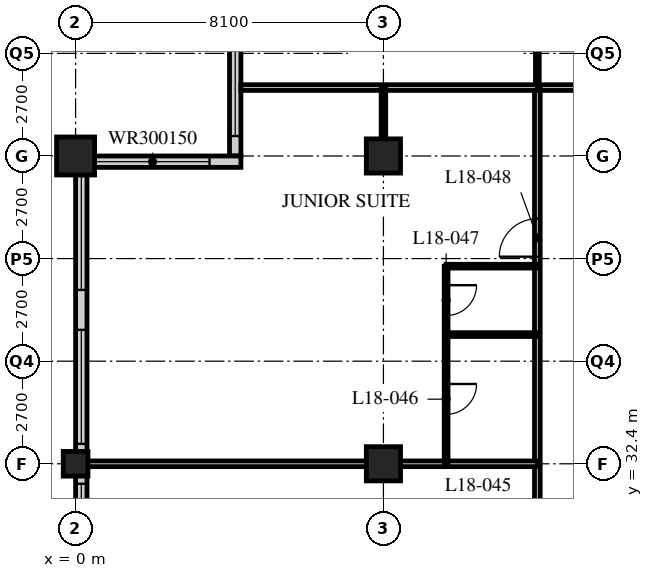
"""IFC4 building model, lengths in metres.
Left out: names, types, materials, properties, quantities, classifications, styles, units other than length and angle.
Written with IfcOpenShell. Run it as: python <this file> out.ifc"""

import sys

from ifc_helpers import new_model, si_unit, direction, frame, frame_2d, origin, origin_2d, place, context, subcontext, project, spatial, rectangle, hollow_rectangle, extrude, element, fill, save


model = new_model("IFC4")
c1 = context("Model", 3, precision=1e-05, world=origin(), true_north=direction((0.0, 1.0)))
c2 = subcontext(c1, "Body", "Model", "MODEL_VIEW")
j1 = project(units=[si_unit("LENGTHUNIT", "METRE"), si_unit("PLANEANGLEUNIT", "RADIAN")], contexts=[c1])
p1 = place(None, origin())
s1 = spatial("IfcSite", under=j1, at=p1, CompositionType="ELEMENT")
p2 = place(p1, origin())
s2 = spatial("IfcBuilding", under=s1, at=p2, CompositionType="ELEMENT")
p3 = place(p2, frame((0.0, 0.0, 73.8)))
s3 = spatial("IfcBuildingStorey", under=s2, at=p3, CompositionType="ELEMENT", Elevation=73.8)
p4 = place(p3, frame((0.0, 32.4, 0.0), z_axis=(0.0, 0.0, 1.0), x_axis=(1.0, 0.0, 0.0)))
e1 = element("IfcColumn", 1, at=p4, inside=s3, PredefinedType="COLUMN", context=c2, shape_type="SweptSolid", body=[
    extrude(hollow_rectangle(XDim=0.65, YDim=0.65, WallThickness=0.05, at=origin_2d()), origin(), (0.0, 0.0, 1.0), 3.4),
])
p5 = place(p3, frame((0.0, 40.5, 0.0), z_axis=(0.0, 0.0, 1.0), x_axis=(1.0, 0.0, 0.0)))
e2 = element("IfcColumn", 2, at=p5, inside=s3, PredefinedType="COLUMN", context=c2, shape_type="SweptSolid", body=[
    extrude(hollow_rectangle(XDim=1.0, YDim=1.0, WallThickness=0.1, at=origin_2d()), origin(), (0.0, 0.0, 1.0), 3.4),
])
for number, where, z_axis, x_axis in (
    (3, (8.1, 32.4, 0.0), (0.0, 0.0, 1.0), (1.0, 0.0, 0.0)),
    (4, (8.1, 40.5, 0.0), (0.0, 0.0, 1.0), (1.0, 0.0, 0.0)),
):
    element("IfcColumn", number, at=place(p3, frame(where, z_axis=z_axis, x_axis=x_axis)), inside=s3, PredefinedType="COLUMN", context=c2, shape_type="SweptSolid", body=[
        extrude(hollow_rectangle(XDim=0.9, YDim=0.9, WallThickness=0.09, at=origin_2d()), origin(), (0.0, 0.0, 1.0), 3.4),
    ])
p6 = place(p3, frame((4.2, 44.25, 0.0), z_axis=(0.0, 0.0, 1.0), x_axis=(0.0, -1.0, 0.0)))
e5 = element("IfcWall", 5, at=p6, inside=s3, PredefinedType="SOLIDWALL", context=c2, shape_type="SweptSolid", body=[
    extrude(rectangle(XDim=3.75, YDim=0.3, at=frame_2d((1.875, 0.0))), origin(), (0.0, 0.0, 1.0), 3.19),
])
p7 = place(p6, frame((0.225, 0.0, 0.9)))
e6 = element("IfcOpeningElement", 6, at=p7, cuts=e5, PredefinedType="OPENING", context=c2, shape_type="SweptSolid", body=[
    extrude(rectangle(XDim=3.0, YDim=1.5, at=frame_2d((1.5, 0.75))), frame((0.0, 0.16, 0.0), z_axis=(0.0, -1.0, 0.0), x_axis=(1.0, 0.0, 0.0)), (0.0, 0.0, 1.0), 0.32),
])
p8 = place(p3, frame((4.35, 40.35, 0.0), z_axis=(0.0, 0.0, 1.0), x_axis=(-1.0, 0.0, 0.0)))
e7 = element("IfcWall", 7, at=p8, inside=s3, PredefinedType="SOLIDWALL", context=c2, shape_type="SweptSolid", body=[
    extrude(rectangle(XDim=4.35, YDim=0.3, at=frame_2d((2.175, 0.0))), origin(), (0.0, 0.0, 1.0), 3.19),
])
p9 = place(p8, frame((0.825, 0.0, 0.9)))
e8 = element("IfcOpeningElement", 8, at=p9, cuts=e7, PredefinedType="OPENING", context=c2, shape_type="SweptSolid", body=[
    extrude(rectangle(XDim=3.0, YDim=1.5, at=frame_2d((1.5, 0.75))), frame((0.0, 0.16, 0.0), z_axis=(0.0, -1.0, 0.0), x_axis=(1.0, 0.0, 0.0)), (0.0, 0.0, 1.0), 0.32),
])
p10 = place(p3, frame((0.15, 40.2, 0.0), z_axis=(0.0, 0.0, 1.0), x_axis=(0.0, -1.0, 0.0)))
e9 = element("IfcWall", 9, at=p10, inside=s3, PredefinedType="SOLIDWALL", context=c2, shape_type="SweptSolid", body=[
    extrude(rectangle(XDim=32.1, YDim=0.3, at=frame_2d((16.05, 0.0))), origin(), (0.0, 0.0, 1.0), 3.19),
])
p11 = place(p10, frame((0.225, 0.0, 0.9)))
e10 = element("IfcOpeningElement", 10, at=p11, cuts=e9, PredefinedType="OPENING", context=c2, shape_type="SweptSolid", body=[
    extrude(rectangle(XDim=3.0, YDim=2.0, at=frame_2d((1.5, 1.0))), frame((0.0, 0.16, 0.0), z_axis=(0.0, -1.0, 0.0), x_axis=(1.0, 0.0, 0.0)), (0.0, 0.0, 1.0), 0.32),
])
p12 = place(p10, frame((4.275, 0.0, 0.9)))
e11 = element("IfcOpeningElement", 11, at=p12, cuts=e9, PredefinedType="OPENING", context=c2, shape_type="SweptSolid", body=[
    extrude(rectangle(XDim=3.0, YDim=2.0, at=frame_2d((1.5, 1.0))), frame((0.0, 0.16, 0.0), z_axis=(0.0, -1.0, 0.0), x_axis=(1.0, 0.0, 0.0)), (0.0, 0.0, 1.0), 0.32),
])
p13 = place(p10, frame((8.325, 0.0, 0.9)))
e12 = element("IfcOpeningElement", 12, at=p13, cuts=e9, PredefinedType="OPENING", context=c2, shape_type="SweptSolid", body=[
    extrude(rectangle(XDim=3.0, YDim=2.0, at=frame_2d((1.5, 1.0))), frame((0.0, 0.16, 0.0), z_axis=(0.0, -1.0, 0.0), x_axis=(1.0, 0.0, 0.0)), (0.0, 0.0, 1.0), 0.32),
])
p14 = place(p10, frame((12.375, 0.0, 0.9)))
e13 = element("IfcOpeningElement", 13, at=p14, cuts=e9, PredefinedType="OPENING", context=c2, shape_type="SweptSolid", body=[
    extrude(rectangle(XDim=3.0, YDim=2.0, at=frame_2d((1.5, 1.0))), frame((0.0, 0.16, 0.0), z_axis=(0.0, -1.0, 0.0), x_axis=(1.0, 0.0, 0.0)), (0.0, 0.0, 1.0), 0.32),
])
p15 = place(p10, frame((16.425, 0.0, 0.9)))
e14 = element("IfcOpeningElement", 14, at=p15, cuts=e9, PredefinedType="OPENING", context=c2, shape_type="SweptSolid", body=[
    extrude(rectangle(XDim=3.0, YDim=2.0, at=frame_2d((1.5, 1.0))), frame((0.0, 0.16, 0.0), z_axis=(0.0, -1.0, 0.0), x_axis=(1.0, 0.0, 0.0)), (0.0, 0.0, 1.0), 0.32),
])
p16 = place(p10, frame((20.475, 0.0, 0.9)))
e15 = element("IfcOpeningElement", 15, at=p16, cuts=e9, PredefinedType="OPENING", context=c2, shape_type="SweptSolid", body=[
    extrude(rectangle(XDim=3.0, YDim=2.0, at=frame_2d((1.5, 1.0))), frame((0.0, 0.16, 0.0), z_axis=(0.0, -1.0, 0.0), x_axis=(1.0, 0.0, 0.0)), (0.0, 0.0, 1.0), 0.32),
])
p17 = place(p10, frame((24.525, 0.0, 0.9)))
e16 = element("IfcOpeningElement", 16, at=p17, cuts=e9, PredefinedType="OPENING", context=c2, shape_type="SweptSolid", body=[
    extrude(rectangle(XDim=3.0, YDim=2.0, at=frame_2d((1.5, 1.0))), frame((0.0, 0.16, 0.0), z_axis=(0.0, -1.0, 0.0), x_axis=(1.0, 0.0, 0.0)), (0.0, 0.0, 1.0), 0.32),
])
p18 = place(p10, frame((28.575, 0.0, 0.9)))
e17 = element("IfcOpeningElement", 17, at=p18, cuts=e9, PredefinedType="OPENING", context=c2, shape_type="SweptSolid", body=[
    extrude(rectangle(XDim=3.0, YDim=2.0, at=frame_2d((1.5, 1.0))), frame((0.0, 0.16, 0.0), z_axis=(0.0, -1.0, 0.0), x_axis=(1.0, 0.0, 0.0)), (0.0, 0.0, 1.0), 0.32),
])
p19 = place(p3, frame((12.15, 42.3, 0.0), z_axis=(0.0, 0.0, 1.0), x_axis=(1.0, 0.0, 0.0)))
e18 = element("IfcWall", 18, at=p19, inside=s3, PredefinedType="PARTITIONING", context=c2, shape_type="SweptSolid", body=[
    extrude(rectangle(XDim=36.45, YDim=0.15, at=frame_2d((18.225, 0.0))), origin(), (0.0, 0.0, 1.0), 3.19),
])
p20 = place(p19, frame((9.5, 0.0, 0.0)))
e19 = element("IfcOpeningElement", 19, at=p20, cuts=e18, PredefinedType="OPENING", context=c2, shape_type="SweptSolid", body=[
    extrude(rectangle(XDim=1.0, YDim=2.1, at=frame_2d((0.5, 1.05))), frame((0.0, 0.085, 0.0), z_axis=(0.0, -1.0, 0.0), x_axis=(1.0, 0.0, 0.0)), (0.0, 0.0, 1.0), 0.17),
])
p21 = place(p19, frame((17.6, 0.0, 0.0)))
e20 = element("IfcOpeningElement", 20, at=p21, cuts=e18, PredefinedType="OPENING", context=c2, shape_type="SweptSolid", body=[
    extrude(rectangle(XDim=1.0, YDim=2.1, at=frame_2d((0.5, 1.05))), frame((0.0, 0.085, 0.0), z_axis=(0.0, -1.0, 0.0), x_axis=(1.0, 0.0, 0.0)), (0.0, 0.0, 1.0), 0.17),
])
p22 = place(p19, frame((22.7, 0.0, 0.0)))
e21 = element("IfcOpeningElement", 21, at=p22, cuts=e18, PredefinedType="OPENING", context=c2, shape_type="SweptSolid", body=[
    extrude(rectangle(XDim=1.0, YDim=2.1, at=frame_2d((0.5, 1.05))), frame((0.0, 0.085, 0.0), z_axis=(0.0, -1.0, 0.0), x_axis=(1.0, 0.0, 0.0)), (0.0, 0.0, 1.0), 0.17),
])
p23 = place(p19, frame((26.75, 0.0, 0.0)))
e22 = element("IfcOpeningElement", 22, at=p23, cuts=e18, PredefinedType="OPENING", context=c2, shape_type="SweptSolid", body=[
    extrude(rectangle(XDim=1.0, YDim=2.1, at=frame_2d((0.5, 1.05))), frame((0.0, 0.085, 0.0), z_axis=(0.0, -1.0, 0.0), x_axis=(1.0, 0.0, 0.0)), (0.0, 0.0, 1.0), 0.17),
])
p24 = place(p19, frame((30.8, 0.0, 0.0)))
e23 = element("IfcOpeningElement", 23, at=p24, cuts=e18, PredefinedType="OPENING", context=c2, shape_type="SweptSolid", body=[
    extrude(rectangle(XDim=1.0, YDim=2.1, at=frame_2d((0.5, 1.05))), frame((0.0, 0.085, 0.0), z_axis=(0.0, -1.0, 0.0), x_axis=(1.0, 0.0, 0.0)), (0.0, 0.0, 1.0), 0.17),
])
p25 = place(p19, frame((32.825, 0.0, 0.0)))
e24 = element("IfcOpeningElement", 24, at=p25, cuts=e18, PredefinedType="OPENING", context=c2, shape_type="SweptSolid", body=[
    extrude(rectangle(XDim=1.0, YDim=2.1, at=frame_2d((0.5, 1.05))), frame((0.0, 0.085, 0.0), z_axis=(0.0, -1.0, 0.0), x_axis=(1.0, 0.0, 0.0)), (0.0, 0.0, 1.0), 0.17),
])
p26 = place(p19, frame((2.625, 0.0, 0.0)))
e25 = element("IfcOpeningElement", 25, at=p26, cuts=e18, PredefinedType="OPENING", context=c2, shape_type="SweptSolid", body=[
    extrude(rectangle(XDim=1.0, YDim=2.1, at=frame_2d((0.5, 1.05))), frame((0.0, 0.085, 0.0), z_axis=(0.0, -1.0, 0.0), x_axis=(1.0, 0.0, 0.0)), (0.0, 0.0, 1.0), 0.17),
])
p27 = place(p3, frame((12.15, 16.2, 0.0), z_axis=(0.0, 0.0, 1.0), x_axis=(0.0, 1.0, 0.0)))
e26 = element("IfcWall", 26, at=p27, inside=s3, PredefinedType="PARTITIONING", context=c2, shape_type="SweptSolid", body=[
    extrude(rectangle(XDim=26.1, YDim=0.15, at=frame_2d((13.05, 0.0))), origin(), (0.0, 0.0, 1.0), 3.19),
])
p28 = place(p27, frame((0.3, 0.0, 0.0)))
e27 = element("IfcOpeningElement", 27, at=p28, cuts=e26, PredefinedType="OPENING", context=c2, shape_type="SweptSolid", body=[
    extrude(rectangle(XDim=1.0, YDim=2.1, at=frame_2d((0.5, 1.05))), frame((0.0, 0.085, 0.0), z_axis=(0.0, -1.0, 0.0), x_axis=(1.0, 0.0, 0.0)), (0.0, 0.0, 1.0), 0.17),
])
p29 = place(p27, frame((6.5, 0.0, 0.0)))
e28 = element("IfcOpeningElement", 28, at=p29, cuts=e26, PredefinedType="OPENING", context=c2, shape_type="SweptSolid", body=[
    extrude(rectangle(XDim=1.0, YDim=2.1, at=frame_2d((0.5, 1.05))), frame((0.0, 0.085, 0.0), z_axis=(0.0, -1.0, 0.0), x_axis=(1.0, 0.0, 0.0)), (0.0, 0.0, 1.0), 0.17),
])
p30 = place(p27, frame((13.55, 0.0, 0.0)))
e29 = element("IfcOpeningElement", 29, at=p30, cuts=e26, PredefinedType="OPENING", context=c2, shape_type="SweptSolid", body=[
    extrude(rectangle(XDim=1.0, YDim=2.1, at=frame_2d((0.5, 1.05))), frame((0.0, 0.085, 0.0), z_axis=(0.0, -1.0, 0.0), x_axis=(1.0, 0.0, 0.0)), (0.0, 0.0, 1.0), 0.17),
])
p31 = place(p27, frame((21.65, 0.0, 0.0)))
e30 = element("IfcOpeningElement", 30, at=p31, cuts=e26, PredefinedType="OPENING", context=c2, shape_type="SweptSolid", body=[
    extrude(rectangle(XDim=1.0, YDim=2.1, at=frame_2d((0.5, 1.05))), frame((0.0, 0.085, 0.0), z_axis=(0.0, -1.0, 0.0), x_axis=(1.0, 0.0, 0.0)), (0.0, 0.0, 1.0), 0.17),
])
p32 = place(p3, frame((12.15, 32.4, 0.0), z_axis=(0.0, 0.0, 1.0), x_axis=(-1.0, 0.0, 0.0)))
e31 = element("IfcWall", 31, at=p32, inside=s3, PredefinedType="PARTITIONING", context=c2, shape_type="SweptSolid", body=[
    extrude(rectangle(XDim=11.85, YDim=0.15, at=frame_2d((5.925, 0.0))), origin(), (0.0, 0.0, 1.0), 2.578),
])
p33 = place(p3, frame((9.75, 32.4, 0.0), z_axis=(0.0, 0.0, 1.0), x_axis=(0.0, 1.0, 0.0)))
e32 = element("IfcWall", 32, at=p33, inside=s3, PredefinedType="PARTITIONING", context=c2, shape_type="SweptSolid", body=[
    extrude(rectangle(XDim=5.2, YDim=0.1, at=frame_2d((2.6, 0.0))), origin(), (0.0, 0.0, 1.0), 3.19),
])
p34 = place(p33, frame((1.3, 0.0, 0.0)))
e33 = element("IfcOpeningElement", 33, at=p34, cuts=e32, PredefinedType="OPENING", context=c2, shape_type="SweptSolid", body=[
    extrude(rectangle(XDim=0.8, YDim=2.1, at=frame_2d((0.4, 1.05))), frame((0.0, 0.06, 0.0), z_axis=(0.0, -1.0, 0.0), x_axis=(1.0, 0.0, 0.0)), (0.0, 0.0, 1.0), 0.12),
])
p35 = place(p33, frame((3.9, 0.0, 0.0)))
e34 = element("IfcOpeningElement", 34, at=p35, cuts=e32, PredefinedType="OPENING", context=c2, shape_type="SweptSolid", body=[
    extrude(rectangle(XDim=0.8, YDim=2.1, at=frame_2d((0.4, 1.05))), frame((0.0, 0.06, 0.0), z_axis=(0.0, -1.0, 0.0), x_axis=(1.0, 0.0, 0.0)), (0.0, 0.0, 1.0), 0.12),
])
for number, where, z_axis, x_axis in (
    (35, (12.15, 35.8, 0.0), (0.0, 0.0, 1.0), (-1.0, 0.0, 0.0)),
    (36, (12.15, 37.6, 0.0), (0.0, 0.0, 1.0), (-1.0, 0.0, 0.0)),
    (37, (12.15, 42.3, 0.0), (0.0, 0.0, 1.0), (0.0, 1.0, 0.0)),
):
    element("IfcWall", number, at=place(p3, frame(where, z_axis=z_axis, x_axis=x_axis)), inside=s3, PredefinedType="PARTITIONING", context=c2, shape_type="SweptSolid", body=[
        extrude(rectangle(XDim=2.4, YDim=0.1, at=frame_2d((1.2, 0.0))), origin(), (0.0, 0.0, 1.0), 3.19),
    ])
p36 = place(p3, frame((4.35, 42.3, 0.0), z_axis=(0.0, 0.0, 1.0), x_axis=(1.0, 0.0, 0.0)))
e38 = element("IfcWall", 38, at=p36, inside=s3, PredefinedType="PARTITIONING", context=c2, shape_type="SweptSolid", body=[
    extrude(rectangle(XDim=7.8, YDim=0.15, at=frame_2d((3.9, 0.0))), origin(), (0.0, 0.0, 1.0), 3.19),
])
p37 = place(p3, frame((8.1, 42.3, 0.0), z_axis=(0.0, 0.0, 1.0), x_axis=(0.0, -1.0, 0.0)))
e39 = element("IfcWall", 39, at=p37, inside=s3, PredefinedType="PARTITIONING", context=c2, shape_type="SweptSolid", body=[
    extrude(rectangle(XDim=1.35, YDim=0.12, at=frame_2d((0.675, 0.0))), origin(), (0.0, 0.0, 1.0), 2.578),
])
p38 = place(p7, origin())
e40 = element("IfcWindow", 40, at=p38, inside=s3, PartitioningType="SINGLE_PANEL", PredefinedType="WINDOW", context=c2, shape_type="SweptSolid", body=[
    extrude(rectangle(XDim=3.0, YDim=1.5, at=frame_2d((1.5, 0.75))), frame((0.0, 0.03, 0.0), z_axis=(0.0, -1.0, 0.0), x_axis=(1.0, 0.0, 0.0)), (0.0, 0.0, 1.0), 0.06),
])
fill(e6, e40)
p39 = place(p9, origin())
e41 = element("IfcWindow", 41, at=p39, inside=s3, PartitioningType="SINGLE_PANEL", PredefinedType="WINDOW", context=c2, shape_type="SweptSolid", body=[
    extrude(rectangle(XDim=3.0, YDim=1.5, at=frame_2d((1.5, 0.75))), frame((0.0, 0.03, 0.0), z_axis=(0.0, -1.0, 0.0), x_axis=(1.0, 0.0, 0.0)), (0.0, 0.0, 1.0), 0.06),
])
fill(e8, e41)
p40 = place(p11, origin())
e42 = element("IfcWindow", 42, at=p40, inside=s3, PartitioningType="SINGLE_PANEL", PredefinedType="WINDOW", context=c2, shape_type="SweptSolid", body=[
    extrude(rectangle(XDim=3.0, YDim=2.0, at=frame_2d((1.5, 1.0))), frame((0.0, 0.03, 0.0), z_axis=(0.0, -1.0, 0.0), x_axis=(1.0, 0.0, 0.0)), (0.0, 0.0, 1.0), 0.06),
])
fill(e10, e42)
p41 = place(p12, origin())
e43 = element("IfcWindow", 43, at=p41, inside=s3, PartitioningType="SINGLE_PANEL", PredefinedType="WINDOW", context=c2, shape_type="SweptSolid", body=[
    extrude(rectangle(XDim=3.0, YDim=2.0, at=frame_2d((1.5, 1.0))), frame((0.0, 0.03, 0.0), z_axis=(0.0, -1.0, 0.0), x_axis=(1.0, 0.0, 0.0)), (0.0, 0.0, 1.0), 0.06),
])
fill(e11, e43)
p42 = place(p13, origin())
e44 = element("IfcWindow", 44, at=p42, inside=s3, PartitioningType="SINGLE_PANEL", PredefinedType="WINDOW", context=c2, shape_type="SweptSolid", body=[
    extrude(rectangle(XDim=3.0, YDim=2.0, at=frame_2d((1.5, 1.0))), frame((0.0, 0.03, 0.0), z_axis=(0.0, -1.0, 0.0), x_axis=(1.0, 0.0, 0.0)), (0.0, 0.0, 1.0), 0.06),
])
fill(e12, e44)
p43 = place(p34, origin())
e45 = element("IfcDoor", 45, at=p43, inside=s3, OperationType="SINGLE_SWING_LEFT", PredefinedType="DOOR", context=c2, shape_type="SweptSolid", body=[
    extrude(rectangle(XDim=0.8, YDim=2.1, at=frame_2d((0.4, 1.05))), frame((0.0, 0.025, 0.0), z_axis=(0.0, -1.0, 0.0), x_axis=(1.0, 0.0, 0.0)), (0.0, 0.0, 1.0), 0.05),
])
fill(e33, e45)
p44 = place(p35, origin())
e46 = element("IfcDoor", 46, at=p44, inside=s3, OperationType="SINGLE_SWING_LEFT", PredefinedType="DOOR", context=c2, shape_type="SweptSolid", body=[
    extrude(rectangle(XDim=0.8, YDim=2.1, at=frame_2d((0.4, 1.05))), frame((0.0, 0.025, 0.0), z_axis=(0.0, -1.0, 0.0), x_axis=(1.0, 0.0, 0.0)), (0.0, 0.0, 1.0), 0.05),
])
fill(e34, e46)
p45 = place(p31, origin())
e47 = element("IfcDoor", 47, at=p45, inside=s3, OperationType="SINGLE_SWING_LEFT", PredefinedType="DOOR", context=c2, shape_type="SweptSolid", body=[
    extrude(rectangle(XDim=1.0, YDim=2.1, at=frame_2d((0.5, 1.05))), frame((0.0, 0.025, 0.0), z_axis=(0.0, -1.0, 0.0), x_axis=(1.0, 0.0, 0.0)), (0.0, 0.0, 1.0), 0.05),
])
fill(e30, e47)
save(model, sys.argv[1])
